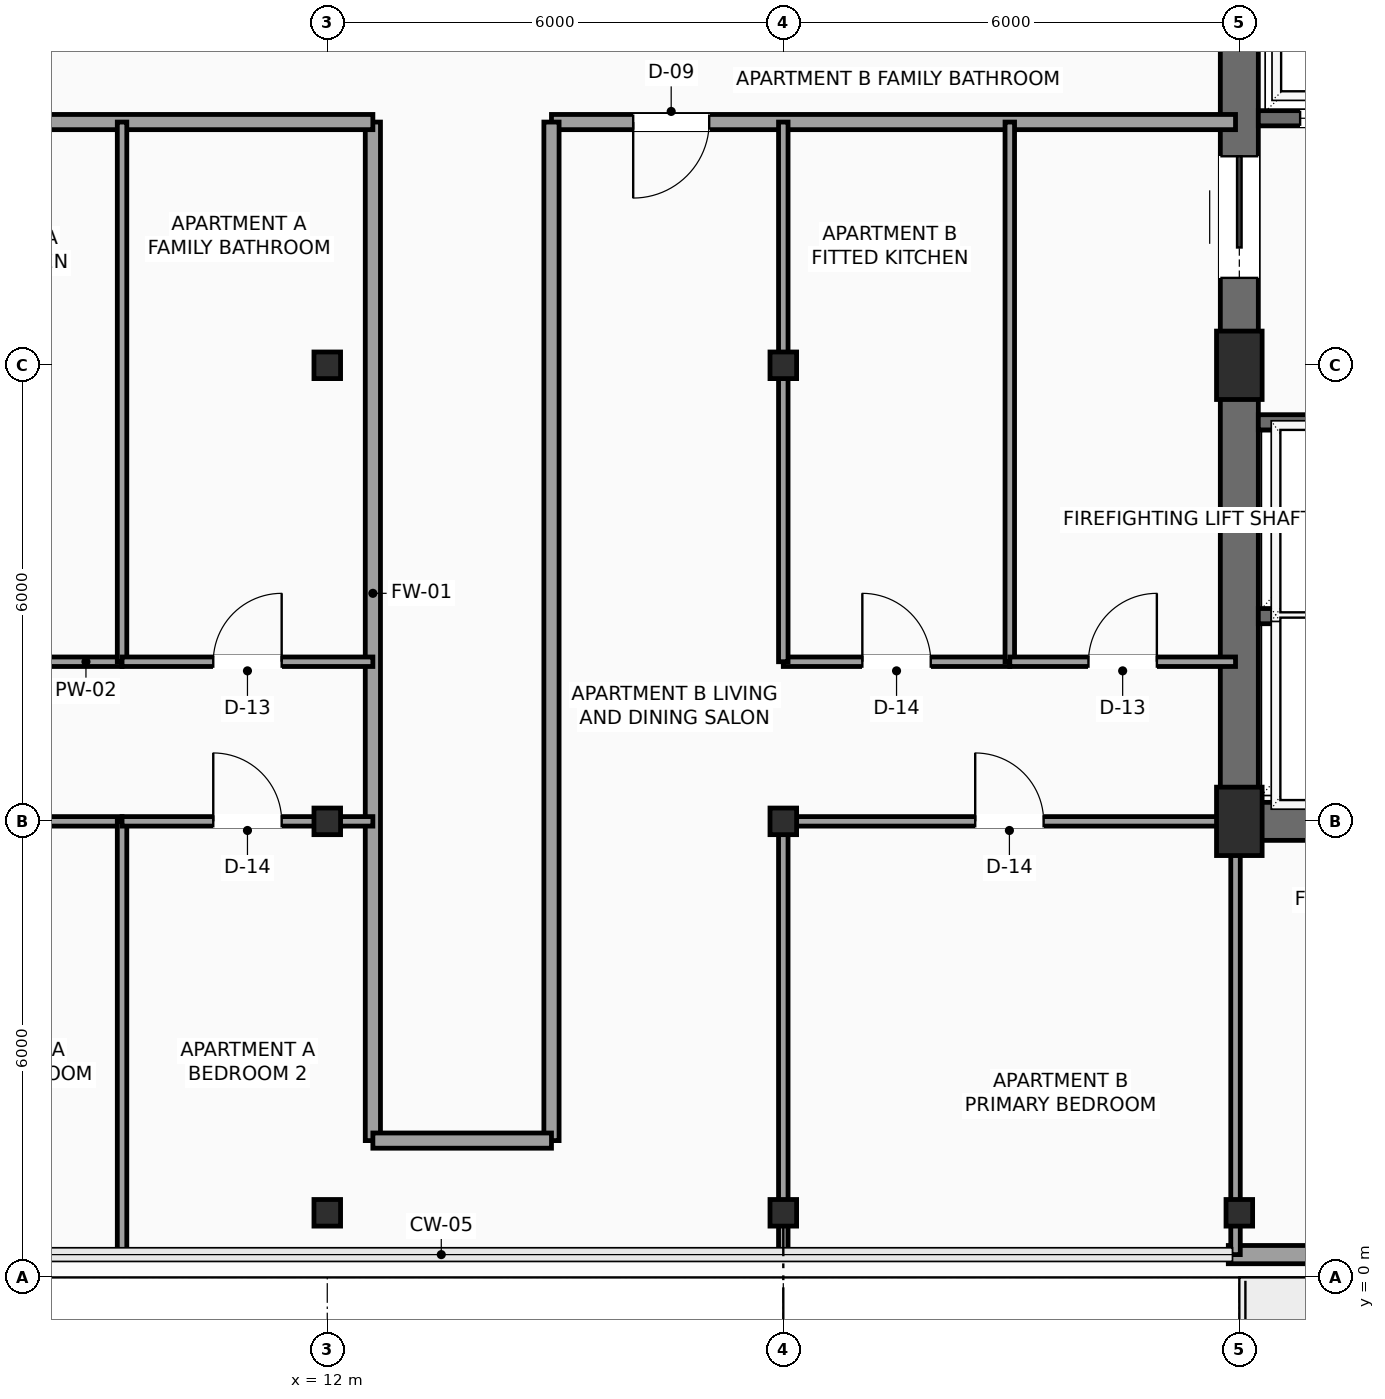
"""IFC4 building model, lengths in metres.
Left out: names, types, materials, properties, quantities, classifications, styles, units other than length and angle.
Written with IfcOpenShell. Run it as: python <this file> out.ifc"""

import sys

from ifc_helpers import new_model, si_unit, direction, frame, frame_2d, origin, origin_2d, place, context, subcontext, project, spatial, rectangle, hollow_rectangle, extrude, element, fill, save


model = new_model("IFC4")
c1 = context("Model", 3, precision=1e-05, world=origin(), true_north=direction((0.0, 1.0)))
c2 = subcontext(c1, "Body", "Model", "MODEL_VIEW")
j1 = project(units=[si_unit("LENGTHUNIT", "METRE"), si_unit("PLANEANGLEUNIT", "RADIAN")], contexts=[c1])
p1 = place(None, origin())
s1 = spatial("IfcSite", under=j1, at=p1, CompositionType="ELEMENT")
p2 = place(p1, origin())
s2 = spatial("IfcBuilding", under=s1, at=p2, CompositionType="ELEMENT")
p3 = place(p2, frame((0.0, 0.0, 257.2)))
s3 = spatial("IfcBuildingStorey", under=s2, at=p3, CompositionType="ELEMENT", Elevation=257.2)
for number, where, z_axis, x_axis in (
    (1, (24.0, 6.0, 0.0), (0.0, 0.0, 1.0), (1.0, 0.0, 0.0)),
    (2, (24.0, 12.0, 0.0), (0.0, 0.0, 1.0), (1.0, 0.0, 0.0)),
):
    element("IfcColumn", number, at=place(p3, frame(where, z_axis=z_axis, x_axis=x_axis)), inside=s3, PredefinedType="COLUMN", context=c2, shape_type="SweptSolid", body=[
        extrude(rectangle(XDim=0.6, YDim=0.9, at=origin_2d()), origin(), (0.0, 0.0, 1.0), 3.5),
    ])
for number, where, z_axis, x_axis in (
    (3, (12.0, 0.85, 0.0), (0.0, 0.0, 1.0), (1.0, 0.0, 0.0)),
    (4, (12.0, 6.0, 0.0), (0.0, 0.0, 1.0), (1.0, 0.0, 0.0)),
    (5, (12.0, 12.0, 0.0), (0.0, 0.0, 1.0), (1.0, 0.0, 0.0)),
    (6, (18.0, 0.85, 0.0), (0.0, 0.0, 1.0), (1.0, 0.0, 0.0)),
    (7, (18.0, 6.0, 0.0), (0.0, 0.0, 1.0), (1.0, 0.0, 0.0)),
    (8, (18.0, 12.0, 0.0), (0.0, 0.0, 1.0), (1.0, 0.0, 0.0)),
    (9, (24.0, 0.85, 0.0), (0.0, 0.0, 1.0), (1.0, 0.0, 0.0)),
):
    element("IfcColumn", number, at=place(p3, frame(where, z_axis=z_axis, x_axis=x_axis)), inside=s3, PredefinedType="COLUMN", context=c2, shape_type="SweptSolid", body=[
        extrude(hollow_rectangle(XDim=0.35, YDim=0.35, WallThickness=0.016, InnerFilletRadius=0.016, OuterFilletRadius=0.032, at=origin_2d()), origin(), (0.0, 0.0, 1.0), 3.5),
    ])
p4 = place(p3, frame((33.145, 0.3, 0.0), z_axis=(0.0, 0.0, 1.0), x_axis=(-1.0, 0.0, 0.0)))
e10 = element("IfcWall", 10, at=p4, inside=s3, PredefinedType="SOLIDWALL", context=c2, shape_type="SweptSolid", body=[
    extrude(rectangle(XDim=9.29, YDim=0.24, at=frame_2d((4.645, 0.0))), origin(), (0.0, 0.0, 1.0), 3.3),
])
p5 = place(p4, frame((3.945, 0.0, 0.0)))
e11 = element("IfcOpeningElement", 11, at=p5, cuts=e10, PredefinedType="OPENING", context=c2, shape_type="SweptSolid", body=[
    extrude(rectangle(XDim=1.05, YDim=2.2, at=frame_2d((0.525, 1.1))), frame((0.0, 0.13, 0.0), z_axis=(0.0, -1.0, 0.0), x_axis=(1.0, 0.0, 0.0)), (0.0, 0.0, 1.0), 0.26),
])
p6 = place(p4, frame((5.345, 0.0, 0.6)))
e12 = element("IfcOpeningElement", 12, at=p6, cuts=e10, PredefinedType="OPENING", context=c2, shape_type="SweptSolid", body=[
    extrude(rectangle(XDim=2.7, YDim=2.3, at=frame_2d((1.35, 1.15))), frame((0.0, 0.13, 0.0), z_axis=(0.0, -1.0, 0.0), x_axis=(1.0, 0.0, 0.0)), (0.0, 0.0, 1.0), 0.26),
])
p7 = place(p4, frame((1.4, 0.0, 0.6)))
e13 = element("IfcOpeningElement", 13, at=p7, cuts=e10, PredefinedType="OPENING", context=c2, shape_type="SweptSolid", body=[
    extrude(rectangle(XDim=0.9, YDim=2.2, at=frame_2d((0.45, 1.1))), frame((0.0, 0.13, 0.0), z_axis=(0.0, -1.0, 0.0), x_axis=(1.0, 0.0, 0.0)), (0.0, 0.0, 1.0), 0.26),
])
p8 = place(p3, frame((24.0, 6.0, 0.0), z_axis=(0.0, 0.0, 1.0), x_axis=(1.0, 0.0, 0.0)))
e14 = element("IfcWall", 14, at=p8, inside=s3, PredefinedType="SHEAR", context=c2, shape_type="SweptSolid", body=[
    extrude(rectangle(XDim=9.6, YDim=0.5, at=frame_2d((4.8, 0.0))), origin(), (0.0, 0.0, 1.0), 3.3),
])
p9 = place(p3, frame((24.0, 6.0, 0.0), z_axis=(0.0, 0.0, 1.0), x_axis=(0.0, 1.0, 0.0)))
e15 = element("IfcWall", 15, at=p9, inside=s3, PredefinedType="SHEAR", context=c2, shape_type="SweptSolid", body=[
    extrude(rectangle(XDim=12.0, YDim=0.5, at=frame_2d((6.0, 0.0))), origin(), (0.0, 0.0, 1.0), 3.3),
])
p10 = place(p9, frame((7.15, 0.0, 0.0)))
e16 = element("IfcOpeningElement", 16, at=p10, cuts=e15, PredefinedType="OPENING", context=c2, shape_type="SweptSolid", body=[
    extrude(rectangle(XDim=1.6, YDim=2.3, at=frame_2d((0.8, 1.15))), frame((0.0, 0.26, 0.0), z_axis=(0.0, -1.0, 0.0), x_axis=(1.0, 0.0, 0.0)), (0.0, 0.0, 1.0), 0.52),
])
for number, where, z_axis, x_axis in (
    (17, (24.25, 8.7, 0.0), (0.0, 0.0, 1.0), (1.0, 0.0, 0.0)),
    (18, (24.25, 11.25, 0.0), (0.0, 0.0, 1.0), (1.0, 0.0, 0.0)),
):
    element("IfcWall", number, at=place(p3, frame(where, z_axis=z_axis, x_axis=x_axis)), inside=s3, PredefinedType="SHEAR", context=c2, shape_type="SweptSolid", body=[
        extrude(rectangle(XDim=2.17, YDim=0.2, at=frame_2d((1.085, 0.0))), origin(), (0.0, 0.0, 1.0), 3.3),
    ])
p11 = place(p3, frame((24.25, 15.25, 0.0), z_axis=(0.0, 0.0, 1.0), x_axis=(1.0, 0.0, 0.0)))
e19 = element("IfcWall", 19, at=p11, inside=s3, PredefinedType="SHEAR", context=c2, shape_type="SweptSolid", body=[
    extrude(rectangle(XDim=5.2, YDim=0.2, at=frame_2d((2.6, 0.0))), origin(), (0.0, 0.0, 1.0), 3.3),
])
p12 = place(p11, frame((0.55, 0.0, 0.0)))
e20 = element("IfcOpeningElement", 20, at=p12, cuts=e19, PredefinedType="OPENING", context=c2, shape_type="SweptSolid", body=[
    extrude(rectangle(XDim=1.2, YDim=2.2, at=frame_2d((0.6, 1.1))), frame((0.0, 0.11, 0.0), z_axis=(0.0, -1.0, 0.0), x_axis=(1.0, 0.0, 0.0)), (0.0, 0.0, 1.0), 0.22),
])
p13 = place(p11, frame((3.15, 0.0, 0.0)))
e21 = element("IfcOpeningElement", 21, at=p13, cuts=e19, PredefinedType="OPENING", context=c2, shape_type="SweptSolid", body=[
    extrude(rectangle(XDim=1.2, YDim=2.2, at=frame_2d((0.6, 1.1))), frame((0.0, 0.11, 0.0), z_axis=(0.0, -1.0, 0.0), x_axis=(1.0, 0.0, 0.0)), (0.0, 0.0, 1.0), 0.22),
])
p14 = place(p3, frame((12.6, 1.8, 0.0), z_axis=(0.0, 0.0, 1.0), x_axis=(0.0, 1.0, 0.0)))
e22 = element("IfcWall", 22, at=p14, inside=s3, PredefinedType="SOLIDWALL", context=c2, shape_type="SweptSolid", body=[
    extrude(rectangle(XDim=13.4, YDim=0.2, at=frame_2d((6.7, 0.0))), origin(), (0.0, 0.0, 1.0), 3.3),
])
p15 = place(p3, frame((12.6, 15.2, 0.0), z_axis=(0.0, 0.0, 1.0), x_axis=(-1.0, 0.0, 0.0)))
e23 = element("IfcWall", 23, at=p15, inside=s3, PredefinedType="SOLIDWALL", context=c2, shape_type="SweptSolid", body=[
    extrude(rectangle(XDim=12.3, YDim=0.2, at=frame_2d((6.15, 0.0))), origin(), (0.0, 0.0, 1.0), 2.932),
])
p16 = place(p15, frame((8.025, 0.0, 0.0)))
e24 = element("IfcOpeningElement", 24, at=p16, cuts=e23, PredefinedType="OPENING", context=c2, shape_type="SweptSolid", body=[
    extrude(rectangle(XDim=1.0, YDim=2.2, at=frame_2d((0.5, 1.1))), frame((0.0, 0.11, 0.0), z_axis=(0.0, -1.0, 0.0), x_axis=(1.0, 0.0, 0.0)), (0.0, 0.0, 1.0), 0.22),
])
p17 = place(p3, frame((23.95, 15.2, 0.0), z_axis=(0.0, 0.0, 1.0), x_axis=(-1.0, 0.0, 0.0)))
e25 = element("IfcWall", 25, at=p17, inside=s3, PredefinedType="SOLIDWALL", context=c2, shape_type="SweptSolid", body=[
    extrude(rectangle(XDim=9.0, YDim=0.2, at=frame_2d((4.5, 0.0))), origin(), (0.0, 0.0, 1.0), 2.932),
])
p18 = place(p17, frame((6.925, 0.0, 0.0)))
e26 = element("IfcOpeningElement", 26, at=p18, cuts=e25, PredefinedType="OPENING", context=c2, shape_type="SweptSolid", body=[
    extrude(rectangle(XDim=1.0, YDim=2.2, at=frame_2d((0.5, 1.1))), frame((0.0, 0.11, 0.0), z_axis=(0.0, -1.0, 0.0), x_axis=(1.0, 0.0, 0.0)), (0.0, 0.0, 1.0), 0.22),
])
p19 = place(p3, frame((14.95, 15.2, 0.0), z_axis=(0.0, 0.0, 1.0), x_axis=(0.0, -1.0, 0.0)))
e27 = element("IfcWall", 27, at=p19, inside=s3, PredefinedType="SOLIDWALL", context=c2, shape_type="SweptSolid", body=[
    extrude(rectangle(XDim=13.4, YDim=0.2, at=frame_2d((6.7, 0.0))), origin(), (0.0, 0.0, 1.0), 3.3),
])
p20 = place(p3, frame((14.95, 1.8, 0.0), z_axis=(0.0, 0.0, 1.0), x_axis=(-1.0, 0.0, 0.0)))
e28 = element("IfcWall", 28, at=p20, inside=s3, PredefinedType="SOLIDWALL", context=c2, shape_type="SweptSolid", body=[
    extrude(rectangle(XDim=2.35, YDim=0.2, at=frame_2d((1.175, 0.0))), origin(), (0.0, 0.0, 1.0), 3.3),
])
p21 = place(p3, frame((0.35, 0.3, 0.0), z_axis=(0.0, 0.0, 1.0), x_axis=(1.0, 0.0, 0.0)))
e29 = element("IfcWall", 29, at=p21, inside=s3, PredefinedType="PARTITIONING", context=c2, shape_type="SweptSolid", body=[
    extrude(rectangle(XDim=12.25, YDim=0.1, at=frame_2d((6.125, 0.0))), origin(), (0.0, 0.0, 1.0), 3.3),
])
p22 = place(p3, frame((6.0, 8.1, 0.0), z_axis=(0.0, 0.0, 1.0), x_axis=(1.0, 0.0, 0.0)))
e30 = element("IfcWall", 30, at=p22, inside=s3, PredefinedType="PARTITIONING", context=c2, shape_type="SweptSolid", body=[
    extrude(rectangle(XDim=3.3, YDim=0.125, at=frame_2d((1.65, 0.0))), origin(), (0.0, 0.0, 1.0), 3.3),
])
p23 = place(p22, frame((1.2, 0.0, 0.0)))
e31 = element("IfcOpeningElement", 31, at=p23, cuts=e30, PredefinedType="OPENING", context=c2, shape_type="SweptSolid", body=[
    extrude(rectangle(XDim=0.9, YDim=2.1, at=frame_2d((0.45, 1.05))), frame((0.0, 0.073, 0.0), z_axis=(0.0, -1.0, 0.0), x_axis=(1.0, 0.0, 0.0)), (0.0, 0.0, 1.0), 0.145),
])
p24 = place(p3, frame((9.3, 8.1, 0.0), z_axis=(0.0, 0.0, 1.0), x_axis=(0.0, 1.0, 0.0)))
e32 = element("IfcWall", 32, at=p24, inside=s3, PredefinedType="PARTITIONING", context=c2, shape_type="SweptSolid", body=[
    extrude(rectangle(XDim=7.1, YDim=0.125, at=frame_2d((3.55, 0.0))), origin(), (0.0, 0.0, 1.0), 3.3),
])
p25 = place(p3, frame((9.3, 8.1, 0.0), z_axis=(0.0, 0.0, 1.0), x_axis=(1.0, 0.0, 0.0)))
e33 = element("IfcWall", 33, at=p25, inside=s3, PredefinedType="PARTITIONING", context=c2, shape_type="SweptSolid", body=[
    extrude(rectangle(XDim=3.3, YDim=0.125, at=frame_2d((1.65, 0.0))), origin(), (0.0, 0.0, 1.0), 3.3),
])
p26 = place(p25, frame((1.2, 0.0, 0.0)))
e34 = element("IfcOpeningElement", 34, at=p26, cuts=e33, PredefinedType="OPENING", context=c2, shape_type="SweptSolid", body=[
    extrude(rectangle(XDim=0.9, YDim=2.1, at=frame_2d((0.45, 1.05))), frame((0.0, 0.073, 0.0), z_axis=(0.0, -1.0, 0.0), x_axis=(1.0, 0.0, 0.0)), (0.0, 0.0, 1.0), 0.145),
])
p27 = place(p3, frame((6.0, 6.0, 0.0), z_axis=(0.0, 0.0, 1.0), x_axis=(1.0, 0.0, 0.0)))
e35 = element("IfcWall", 35, at=p27, inside=s3, PredefinedType="PARTITIONING", context=c2, shape_type="SweptSolid", body=[
    extrude(rectangle(XDim=3.3, YDim=0.125, at=frame_2d((1.65, 0.0))), origin(), (0.0, 0.0, 1.0), 2.992),
])
p28 = place(p27, frame((1.2, 0.0, 0.0)))
e36 = element("IfcOpeningElement", 36, at=p28, cuts=e35, PredefinedType="OPENING", context=c2, shape_type="SweptSolid", body=[
    extrude(rectangle(XDim=0.9, YDim=2.1, at=frame_2d((0.45, 1.05))), frame((0.0, 0.073, 0.0), z_axis=(0.0, -1.0, 0.0), x_axis=(1.0, 0.0, 0.0)), (0.0, 0.0, 1.0), 0.145),
])
p29 = place(p3, frame((9.3, 0.3, 0.0), z_axis=(0.0, 0.0, 1.0), x_axis=(0.0, 1.0, 0.0)))
e37 = element("IfcWall", 37, at=p29, inside=s3, PredefinedType="PARTITIONING", context=c2, shape_type="SweptSolid", body=[
    extrude(rectangle(XDim=5.7, YDim=0.125, at=frame_2d((2.85, 0.0))), origin(), (0.0, 0.0, 1.0), 3.3),
])
p30 = place(p3, frame((9.3, 6.0, 0.0), z_axis=(0.0, 0.0, 1.0), x_axis=(1.0, 0.0, 0.0)))
e38 = element("IfcWall", 38, at=p30, inside=s3, PredefinedType="PARTITIONING", context=c2, shape_type="SweptSolid", body=[
    extrude(rectangle(XDim=3.3, YDim=0.125, at=frame_2d((1.65, 0.0))), origin(), (0.0, 0.0, 1.0), 2.992),
])
p31 = place(p30, frame((1.2, 0.0, 0.0)))
e39 = element("IfcOpeningElement", 39, at=p31, cuts=e38, PredefinedType="OPENING", context=c2, shape_type="SweptSolid", body=[
    extrude(rectangle(XDim=0.9, YDim=2.1, at=frame_2d((0.45, 1.05))), frame((0.0, 0.073, 0.0), z_axis=(0.0, -1.0, 0.0), x_axis=(1.0, 0.0, 0.0)), (0.0, 0.0, 1.0), 0.145),
])
p32 = place(p3, frame((18.0, 8.1, 0.0), z_axis=(0.0, 0.0, 1.0), x_axis=(1.0, 0.0, 0.0)))
e40 = element("IfcWall", 40, at=p32, inside=s3, PredefinedType="PARTITIONING", context=c2, shape_type="SweptSolid", body=[
    extrude(rectangle(XDim=2.98, YDim=0.125, at=frame_2d((1.49, 0.0))), origin(), (0.0, 0.0, 1.0), 3.3),
])
p33 = place(p32, frame((1.04, 0.0, 0.0)))
e41 = element("IfcOpeningElement", 41, at=p33, cuts=e40, PredefinedType="OPENING", context=c2, shape_type="SweptSolid", body=[
    extrude(rectangle(XDim=0.9, YDim=2.1, at=frame_2d((0.45, 1.05))), frame((0.0, 0.073, 0.0), z_axis=(0.0, -1.0, 0.0), x_axis=(1.0, 0.0, 0.0)), (0.0, 0.0, 1.0), 0.145),
])
p34 = place(p3, frame((18.0, 8.1, 0.0), z_axis=(0.0, 0.0, 1.0), x_axis=(0.0, 1.0, 0.0)))
e42 = element("IfcWall", 42, at=p34, inside=s3, PredefinedType="PARTITIONING", context=c2, shape_type="SweptSolid", body=[
    extrude(rectangle(XDim=7.1, YDim=0.125, at=frame_2d((3.55, 0.0))), origin(), (0.0, 0.0, 1.0), 2.992),
])
p35 = place(p3, frame((20.98, 8.1, 0.0), z_axis=(0.0, 0.0, 1.0), x_axis=(0.0, 1.0, 0.0)))
e43 = element("IfcWall", 43, at=p35, inside=s3, PredefinedType="PARTITIONING", context=c2, shape_type="SweptSolid", body=[
    extrude(rectangle(XDim=7.1, YDim=0.125, at=frame_2d((3.55, 0.0))), origin(), (0.0, 0.0, 1.0), 3.3),
])
p36 = place(p3, frame((20.98, 8.1, 0.0), z_axis=(0.0, 0.0, 1.0), x_axis=(1.0, 0.0, 0.0)))
e44 = element("IfcWall", 44, at=p36, inside=s3, PredefinedType="PARTITIONING", context=c2, shape_type="SweptSolid", body=[
    extrude(rectangle(XDim=2.97, YDim=0.125, at=frame_2d((1.485, 0.0))), origin(), (0.0, 0.0, 1.0), 3.3),
])
p37 = place(p36, frame((1.035, 0.0, 0.0)))
e45 = element("IfcOpeningElement", 45, at=p37, cuts=e44, PredefinedType="OPENING", context=c2, shape_type="SweptSolid", body=[
    extrude(rectangle(XDim=0.9, YDim=2.1, at=frame_2d((0.45, 1.05))), frame((0.0, 0.073, 0.0), z_axis=(0.0, -1.0, 0.0), x_axis=(1.0, 0.0, 0.0)), (0.0, 0.0, 1.0), 0.145),
])
p38 = place(p3, frame((18.0, 6.0, 0.0), z_axis=(0.0, 0.0, 1.0), x_axis=(1.0, 0.0, 0.0)))
e46 = element("IfcWall", 46, at=p38, inside=s3, PredefinedType="PARTITIONING", context=c2, shape_type="SweptSolid", body=[
    extrude(rectangle(XDim=5.95, YDim=0.125, at=frame_2d((2.975, 0.0))), origin(), (0.0, 0.0, 1.0), 2.992),
])
p39 = place(p38, frame((2.525, 0.0, 0.0)))
e47 = element("IfcOpeningElement", 47, at=p39, cuts=e46, PredefinedType="OPENING", context=c2, shape_type="SweptSolid", body=[
    extrude(rectangle(XDim=0.9, YDim=2.1, at=frame_2d((0.45, 1.05))), frame((0.0, 0.073, 0.0), z_axis=(0.0, -1.0, 0.0), x_axis=(1.0, 0.0, 0.0)), (0.0, 0.0, 1.0), 0.145),
])
p40 = place(p3, frame((18.0, 0.3, 0.0), z_axis=(0.0, 0.0, 1.0), x_axis=(0.0, 1.0, 0.0)))
e48 = element("IfcWall", 48, at=p40, inside=s3, PredefinedType="PARTITIONING", context=c2, shape_type="SweptSolid", body=[
    extrude(rectangle(XDim=5.7, YDim=0.125, at=frame_2d((2.85, 0.0))), origin(), (0.0, 0.0, 1.0), 2.992),
])
p41 = place(p3, frame((23.95, 0.3, 0.0), z_axis=(0.0, 0.0, 1.0), x_axis=(0.0, 1.0, 0.0)))
e49 = element("IfcWall", 49, at=p41, inside=s3, PredefinedType="PARTITIONING", context=c2, shape_type="SweptSolid", body=[
    extrude(rectangle(XDim=5.7, YDim=0.125, at=frame_2d((2.85, 0.0))), origin(), (0.0, 0.0, 1.0), 2.967),
])
p42 = place(p10, origin())
e50 = element("IfcDoor", 50, at=p42, inside=s3, OperationType="DOUBLE_DOOR_SLIDING", PredefinedType="DOOR", context=c2, shape_type="SweptSolid", body=[
    extrude(rectangle(XDim=1.6, YDim=2.3, at=frame_2d((0.8, 1.15))), frame((0.0, 0.025, 0.0), z_axis=(0.0, -1.0, 0.0), x_axis=(1.0, 0.0, 0.0)), (0.0, 0.0, 1.0), 0.05),
])
fill(e16, e50)
p43 = place(p12, origin())
e51 = element("IfcDoor", 51, at=p43, inside=s3, OperationType="SLIDING_TO_RIGHT", PredefinedType="DOOR", context=c2, shape_type="SweptSolid", body=[
    extrude(rectangle(XDim=1.2, YDim=2.2, at=frame_2d((0.6, 1.1))), frame((0.0, 0.025, 0.0), z_axis=(0.0, -1.0, 0.0), x_axis=(1.0, 0.0, 0.0)), (0.0, 0.0, 1.0), 0.05),
])
fill(e20, e51)
p44 = place(p18, origin())
e52 = element("IfcDoor", 52, at=p44, inside=s3, OperationType="SINGLE_SWING_RIGHT", PredefinedType="DOOR", context=c2, shape_type="SweptSolid", body=[
    extrude(rectangle(XDim=1.0, YDim=2.2, at=frame_2d((0.5, 1.1))), frame((0.0, 0.025, 0.0), z_axis=(0.0, -1.0, 0.0), x_axis=(1.0, 0.0, 0.0)), (0.0, 0.0, 1.0), 0.05),
])
fill(e26, e52)
p45 = place(p26, origin())
e53 = element("IfcDoor", 53, at=p45, inside=s3, OperationType="SINGLE_SWING_RIGHT", PredefinedType="DOOR", context=c2, shape_type="SweptSolid", body=[
    extrude(rectangle(XDim=0.9, YDim=2.1, at=frame_2d((0.45, 1.05))), frame((0.0, 0.025, 0.0), z_axis=(0.0, -1.0, 0.0), x_axis=(1.0, 0.0, 0.0)), (0.0, 0.0, 1.0), 0.05),
])
fill(e34, e53)
p46 = place(p31, origin())
e54 = element("IfcDoor", 54, at=p46, inside=s3, OperationType="SINGLE_SWING_LEFT", PredefinedType="DOOR", context=c2, shape_type="SweptSolid", body=[
    extrude(rectangle(XDim=0.9, YDim=2.1, at=frame_2d((0.45, 1.05))), frame((0.0, 0.025, 0.0), z_axis=(0.0, -1.0, 0.0), x_axis=(1.0, 0.0, 0.0)), (0.0, 0.0, 1.0), 0.05),
])
fill(e39, e54)
p47 = place(p33, origin())
e55 = element("IfcDoor", 55, at=p47, inside=s3, OperationType="SINGLE_SWING_LEFT", PredefinedType="DOOR", context=c2, shape_type="SweptSolid", body=[
    extrude(rectangle(XDim=0.9, YDim=2.1, at=frame_2d((0.45, 1.05))), frame((0.0, 0.025, 0.0), z_axis=(0.0, -1.0, 0.0), x_axis=(1.0, 0.0, 0.0)), (0.0, 0.0, 1.0), 0.05),
])
fill(e41, e55)
p48 = place(p37, origin())
e56 = element("IfcDoor", 56, at=p48, inside=s3, OperationType="SINGLE_SWING_RIGHT", PredefinedType="DOOR", context=c2, shape_type="SweptSolid", body=[
    extrude(rectangle(XDim=0.9, YDim=2.1, at=frame_2d((0.45, 1.05))), frame((0.0, 0.025, 0.0), z_axis=(0.0, -1.0, 0.0), x_axis=(1.0, 0.0, 0.0)), (0.0, 0.0, 1.0), 0.05),
])
fill(e45, e56)
p49 = place(p39, origin())
e57 = element("IfcDoor", 57, at=p49, inside=s3, OperationType="SINGLE_SWING_LEFT", PredefinedType="DOOR", context=c2, shape_type="SweptSolid", body=[
    extrude(rectangle(XDim=0.9, YDim=2.1, at=frame_2d((0.45, 1.05))), frame((0.0, 0.025, 0.0), z_axis=(0.0, -1.0, 0.0), x_axis=(1.0, 0.0, 0.0)), (0.0, 0.0, 1.0), 0.05),
])
fill(e47, e57)
save(model, sys.argv[1])
